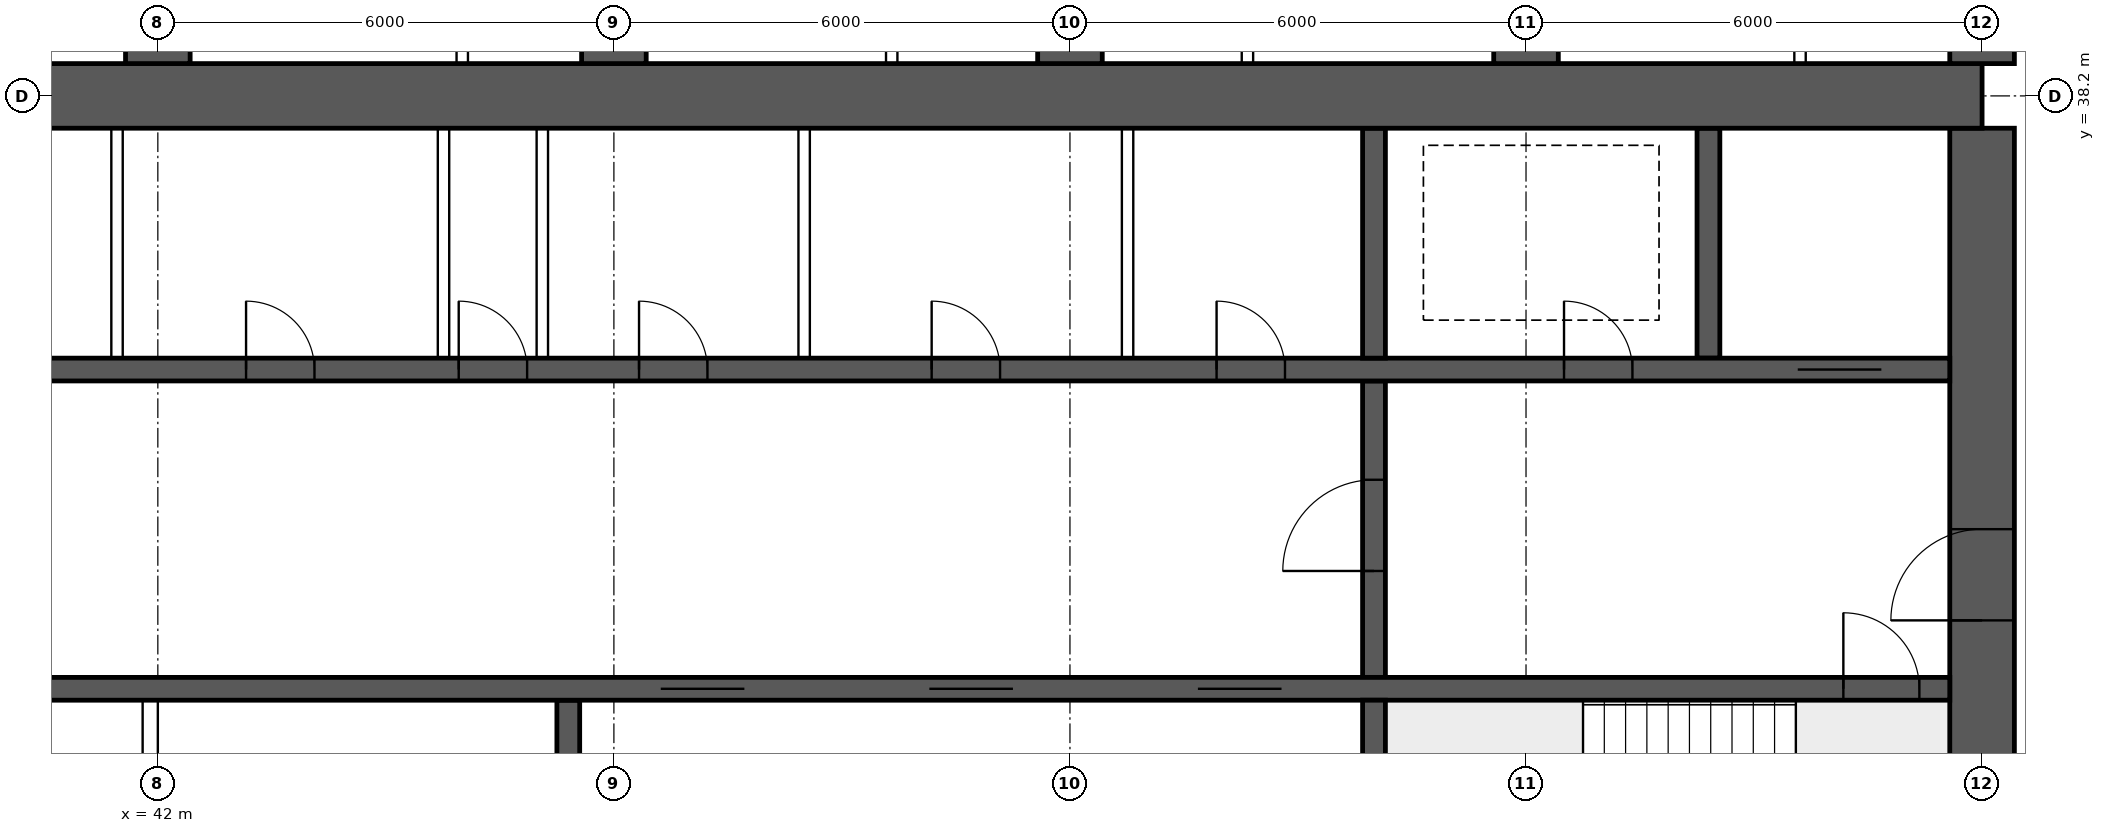
"""IFC4 building model, lengths in metres.
Left out: names, types, materials, properties, quantities, classifications, styles, units other than length and angle.
Written with IfcOpenShell. Run it as: python <this file> out.ifc"""

import sys

from ifc_helpers import new_model, si_unit, direction, frame, frame_2d, origin, place, context, subcontext, project, spatial, rectangle, extrude, element, fill, save


model = new_model("IFC4")
c1 = context("Model", 3, precision=1e-05, world=origin(), true_north=direction((0.0, 1.0)))
c2 = subcontext(c1, "Body", "Model", "MODEL_VIEW")
j1 = project(units=[si_unit("LENGTHUNIT", "METRE"), si_unit("PLANEANGLEUNIT", "RADIAN")], contexts=[c1])
p1 = place(None, origin())
s1 = spatial("IfcSite", under=j1, at=p1, CompositionType="ELEMENT")
p2 = place(p1, origin())
s2 = spatial("IfcBuilding", under=s1, at=p2, CompositionType="ELEMENT")
p3 = place(p2, frame((0.0, 0.0, 163.6)))
s3 = spatial("IfcBuildingStorey", under=s2, at=p3, CompositionType="ELEMENT", Elevation=163.6)
p4 = place(p3, frame((18.0, 38.2, 0.0), z_axis=(0.0, 0.0, 1.0), x_axis=(1.0, 0.0, 0.0)))
e1 = element("IfcWall", 1, at=p4, inside=s3, PredefinedType="SHEAR", context=c2, shape_type="SweptSolid", body=[
    extrude(rectangle(XDim=48.0, YDim=0.85, at=frame_2d((24.0, 0.0))), origin(), (0.0, 0.0, 1.0), 3.75),
])
p5 = place(p3, frame((66.0, 26.225, 0.0), z_axis=(0.0, 0.0, 1.0), x_axis=(0.0, 1.0, 0.0)))
e2 = element("IfcWall", 2, at=p5, inside=s3, PredefinedType="SHEAR", context=c2, shape_type="SweptSolid", body=[
    extrude(rectangle(XDim=11.55, YDim=0.85, at=frame_2d((5.775, 0.0))), origin(), (0.0, 0.0, 1.0), 3.75),
])
p6 = place(p5, frame((5.075, 0.0, 0.0)))
e3 = element("IfcOpeningElement", 3, at=p6, cuts=e2, PredefinedType="OPENING", context=c2, shape_type="SweptSolid", body=[
    extrude(rectangle(XDim=1.2, YDim=2.1, at=frame_2d((0.6, 1.05))), frame((0.0, 0.435, 0.0), z_axis=(0.0, -1.0, 0.0), x_axis=(1.0, 0.0, 0.0)), (0.0, 0.0, 1.0), 0.87),
])
p7 = place(p3, frame((18.425, 30.4, 0.0), z_axis=(0.0, 0.0, 1.0), x_axis=(1.0, 0.0, 0.0)))
e4 = element("IfcWall", 4, at=p7, inside=s3, PredefinedType="SHEAR", context=c2, shape_type="SweptSolid", body=[
    extrude(rectangle(XDim=47.15, YDim=0.3, at=frame_2d((23.575, 0.0))), origin(), (0.0, 0.0, 1.0), 3.75),
])
p8 = place(p7, frame((0.4, 0.0, 0.0)))
e5 = element("IfcOpeningElement", 5, at=p8, cuts=e4, PredefinedType="OPENING", context=c2, shape_type="SweptSolid", body=[
    extrude(rectangle(XDim=1.0, YDim=2.1, at=frame_2d((0.5, 1.05))), frame((0.0, 0.16, 0.0), z_axis=(0.0, -1.0, 0.0), x_axis=(1.0, 0.0, 0.0)), (0.0, 0.0, 1.0), 0.32),
])
p9 = place(p7, frame((45.75, 0.0, 0.0)))
e6 = element("IfcOpeningElement", 6, at=p9, cuts=e4, PredefinedType="OPENING", context=c2, shape_type="SweptSolid", body=[
    extrude(rectangle(XDim=1.0, YDim=2.1, at=frame_2d((0.5, 1.05))), frame((0.0, 0.16, 0.0), z_axis=(0.0, -1.0, 0.0), x_axis=(1.0, 0.0, 0.0)), (0.0, 0.0, 1.0), 0.32),
])
p10 = place(p7, frame((8.325, 0.0, 0.0)))
e7 = element("IfcOpeningElement", 7, at=p10, cuts=e4, PredefinedType="OPENING", context=c2, shape_type="SweptSolid", body=[
    extrude(rectangle(XDim=1.1, YDim=2.1, at=frame_2d((0.55, 1.05))), frame((0.0, 0.16, 0.0), z_axis=(0.0, -1.0, 0.0), x_axis=(1.0, 0.0, 0.0)), (0.0, 0.0, 1.0), 0.32),
])
p11 = place(p7, frame((10.925, 0.0, 0.0)))
e8 = element("IfcOpeningElement", 8, at=p11, cuts=e4, PredefinedType="OPENING", context=c2, shape_type="SweptSolid", body=[
    extrude(rectangle(XDim=1.1, YDim=2.1, at=frame_2d((0.55, 1.05))), frame((0.0, 0.16, 0.0), z_axis=(0.0, -1.0, 0.0), x_axis=(1.0, 0.0, 0.0)), (0.0, 0.0, 1.0), 0.32),
])
p12 = place(p7, frame((13.525, 0.0, 0.0)))
e9 = element("IfcOpeningElement", 9, at=p12, cuts=e4, PredefinedType="OPENING", context=c2, shape_type="SweptSolid", body=[
    extrude(rectangle(XDim=1.1, YDim=2.1, at=frame_2d((0.55, 1.05))), frame((0.0, 0.16, 0.0), z_axis=(0.0, -1.0, 0.0), x_axis=(1.0, 0.0, 0.0)), (0.0, 0.0, 1.0), 0.32),
])
p13 = place(p7, frame((16.125, 0.0, 0.0)))
e10 = element("IfcOpeningElement", 10, at=p13, cuts=e4, PredefinedType="OPENING", context=c2, shape_type="SweptSolid", body=[
    extrude(rectangle(XDim=1.1, YDim=2.1, at=frame_2d((0.55, 1.05))), frame((0.0, 0.16, 0.0), z_axis=(0.0, -1.0, 0.0), x_axis=(1.0, 0.0, 0.0)), (0.0, 0.0, 1.0), 0.32),
])
p14 = place(p7, frame((18.9, 0.0, 0.0)))
e11 = element("IfcOpeningElement", 11, at=p14, cuts=e4, PredefinedType="OPENING", context=c2, shape_type="SweptSolid", body=[
    extrude(rectangle(XDim=0.9, YDim=2.1, at=frame_2d((0.45, 1.05))), frame((0.0, 0.16, 0.0), z_axis=(0.0, -1.0, 0.0), x_axis=(1.0, 0.0, 0.0)), (0.0, 0.0, 1.0), 0.32),
])
p15 = place(p7, frame((30.192, 0.0, 0.0)))
e12 = element("IfcOpeningElement", 12, at=p15, cuts=e4, PredefinedType="OPENING", context=c2, shape_type="SweptSolid", body=[
    extrude(rectangle(XDim=1.1, YDim=2.1, at=frame_2d((0.55, 1.05))), frame((0.0, 0.16, 0.0), z_axis=(0.0, -1.0, 0.0), x_axis=(1.0, 0.0, 0.0)), (0.0, 0.0, 1.0), 0.32),
])
p16 = place(p7, frame((33.725, 0.0, 0.0)))
e13 = element("IfcOpeningElement", 13, at=p16, cuts=e4, PredefinedType="OPENING", context=c2, shape_type="SweptSolid", body=[
    extrude(rectangle(XDim=1.1, YDim=2.1, at=frame_2d((0.55, 1.05))), frame((0.0, 0.16, 0.0), z_axis=(0.0, -1.0, 0.0), x_axis=(1.0, 0.0, 0.0)), (0.0, 0.0, 1.0), 0.32),
])
p17 = place(p7, frame((37.258, 0.0, 0.0)))
e14 = element("IfcOpeningElement", 14, at=p17, cuts=e4, PredefinedType="OPENING", context=c2, shape_type="SweptSolid", body=[
    extrude(rectangle(XDim=1.1, YDim=2.1, at=frame_2d((0.55, 1.05))), frame((0.0, 0.16, 0.0), z_axis=(0.0, -1.0, 0.0), x_axis=(1.0, 0.0, 0.0)), (0.0, 0.0, 1.0), 0.32),
])
p18 = place(p3, frame((18.425, 34.6, 0.0), z_axis=(0.0, 0.0, 1.0), x_axis=(1.0, 0.0, 0.0)))
e15 = element("IfcWall", 15, at=p18, inside=s3, PredefinedType="SHEAR", context=c2, shape_type="SweptSolid", body=[
    extrude(rectangle(XDim=47.15, YDim=0.3, at=frame_2d((23.575, 0.0))), origin(), (0.0, 0.0, 1.0), 3.75),
])
p19 = place(p18, frame((0.9, 0.0, 0.0)))
e16 = element("IfcOpeningElement", 16, at=p19, cuts=e15, PredefinedType="OPENING", context=c2, shape_type="SweptSolid", body=[
    extrude(rectangle(XDim=1.1, YDim=2.1, at=frame_2d((0.55, 1.05))), frame((0.0, 0.16, 0.0), z_axis=(0.0, -1.0, 0.0), x_axis=(1.0, 0.0, 0.0)), (0.0, 0.0, 1.0), 0.32),
])
p20 = place(p18, frame((45.15, 0.0, 0.0)))
e17 = element("IfcOpeningElement", 17, at=p20, cuts=e15, PredefinedType="OPENING", context=c2, shape_type="SweptSolid", body=[
    extrude(rectangle(XDim=1.1, YDim=2.1, at=frame_2d((0.55, 1.05))), frame((0.0, 0.16, 0.0), z_axis=(0.0, -1.0, 0.0), x_axis=(1.0, 0.0, 0.0)), (0.0, 0.0, 1.0), 0.32),
])
p21 = place(p18, frame((4.175, 0.0, 0.0)))
e18 = element("IfcOpeningElement", 18, at=p21, cuts=e15, PredefinedType="OPENING", context=c2, shape_type="SweptSolid", body=[
    extrude(rectangle(XDim=0.9, YDim=2.1, at=frame_2d((0.45, 1.05))), frame((0.0, 0.16, 0.0), z_axis=(0.0, -1.0, 0.0), x_axis=(1.0, 0.0, 0.0)), (0.0, 0.0, 1.0), 0.32),
])
p22 = place(p18, frame((42.075, 0.0, 0.0)))
e19 = element("IfcOpeningElement", 19, at=p22, cuts=e15, PredefinedType="OPENING", context=c2, shape_type="SweptSolid", body=[
    extrude(rectangle(XDim=0.9, YDim=2.1, at=frame_2d((0.45, 1.05))), frame((0.0, 0.16, 0.0), z_axis=(0.0, -1.0, 0.0), x_axis=(1.0, 0.0, 0.0)), (0.0, 0.0, 1.0), 0.32),
])
p23 = place(p18, frame((8.95, 0.0, 0.0)))
e20 = element("IfcOpeningElement", 20, at=p23, cuts=e15, PredefinedType="OPENING", context=c2, shape_type="SweptSolid", body=[
    extrude(rectangle(XDim=0.9, YDim=2.1, at=frame_2d((0.45, 1.05))), frame((0.0, 0.16, 0.0), z_axis=(0.0, -1.0, 0.0), x_axis=(1.0, 0.0, 0.0)), (0.0, 0.0, 1.0), 0.32),
])
p24 = place(p18, frame((12.924, 0.0, 0.0)))
e21 = element("IfcOpeningElement", 21, at=p24, cuts=e15, PredefinedType="OPENING", context=c2, shape_type="SweptSolid", body=[
    extrude(rectangle(XDim=0.9, YDim=2.1, at=frame_2d((0.45, 1.05))), frame((0.0, 0.16, 0.0), z_axis=(0.0, -1.0, 0.0), x_axis=(1.0, 0.0, 0.0)), (0.0, 0.0, 1.0), 0.32),
])
p25 = place(p18, frame((16.571, 0.0, 0.0)))
e22 = element("IfcOpeningElement", 22, at=p25, cuts=e15, PredefinedType="OPENING", context=c2, shape_type="SweptSolid", body=[
    extrude(rectangle(XDim=0.9, YDim=2.1, at=frame_2d((0.45, 1.05))), frame((0.0, 0.16, 0.0), z_axis=(0.0, -1.0, 0.0), x_axis=(1.0, 0.0, 0.0)), (0.0, 0.0, 1.0), 0.32),
])
p26 = place(p18, frame((20.33, 0.0, 0.0)))
e23 = element("IfcOpeningElement", 23, at=p26, cuts=e15, PredefinedType="OPENING", context=c2, shape_type="SweptSolid", body=[
    extrude(rectangle(XDim=0.9, YDim=2.1, at=frame_2d((0.45, 1.05))), frame((0.0, 0.16, 0.0), z_axis=(0.0, -1.0, 0.0), x_axis=(1.0, 0.0, 0.0)), (0.0, 0.0, 1.0), 0.32),
])
p27 = place(p18, frame((24.736, 0.0, 0.0)))
e24 = element("IfcOpeningElement", 24, at=p27, cuts=e15, PredefinedType="OPENING", context=c2, shape_type="SweptSolid", body=[
    extrude(rectangle(XDim=0.9, YDim=2.1, at=frame_2d((0.45, 1.05))), frame((0.0, 0.16, 0.0), z_axis=(0.0, -1.0, 0.0), x_axis=(1.0, 0.0, 0.0)), (0.0, 0.0, 1.0), 0.32),
])
p28 = place(p18, frame((27.533, 0.0, 0.0)))
e25 = element("IfcOpeningElement", 25, at=p28, cuts=e15, PredefinedType="OPENING", context=c2, shape_type="SweptSolid", body=[
    extrude(rectangle(XDim=0.9, YDim=2.1, at=frame_2d((0.45, 1.05))), frame((0.0, 0.16, 0.0), z_axis=(0.0, -1.0, 0.0), x_axis=(1.0, 0.0, 0.0)), (0.0, 0.0, 1.0), 0.32),
])
p29 = place(p18, frame((29.906, 0.0, 0.0)))
e26 = element("IfcOpeningElement", 26, at=p29, cuts=e15, PredefinedType="OPENING", context=c2, shape_type="SweptSolid", body=[
    extrude(rectangle(XDim=0.9, YDim=2.1, at=frame_2d((0.45, 1.05))), frame((0.0, 0.16, 0.0), z_axis=(0.0, -1.0, 0.0), x_axis=(1.0, 0.0, 0.0)), (0.0, 0.0, 1.0), 0.32),
])
p30 = place(p18, frame((33.756, 0.0, 0.0)))
e27 = element("IfcOpeningElement", 27, at=p30, cuts=e15, PredefinedType="OPENING", context=c2, shape_type="SweptSolid", body=[
    extrude(rectangle(XDim=0.9, YDim=2.1, at=frame_2d((0.45, 1.05))), frame((0.0, 0.16, 0.0), z_axis=(0.0, -1.0, 0.0), x_axis=(1.0, 0.0, 0.0)), (0.0, 0.0, 1.0), 0.32),
])
p31 = place(p18, frame((37.504, 0.0, 0.0)))
e28 = element("IfcOpeningElement", 28, at=p31, cuts=e15, PredefinedType="OPENING", context=c2, shape_type="SweptSolid", body=[
    extrude(rectangle(XDim=0.9, YDim=2.1, at=frame_2d((0.45, 1.05))), frame((0.0, 0.16, 0.0), z_axis=(0.0, -1.0, 0.0), x_axis=(1.0, 0.0, 0.0)), (0.0, 0.0, 1.0), 0.32),
])
p32 = place(p3, frame((58.0, 26.225, 0.0), z_axis=(0.0, 0.0, 1.0), x_axis=(0.0, 1.0, 0.0)))
e29 = element("IfcWall", 29, at=p32, inside=s3, PredefinedType="SHEAR", context=c2, shape_type="SweptSolid", body=[
    extrude(rectangle(XDim=4.025, YDim=0.3, at=frame_2d((2.012, 0.0))), origin(), (0.0, 0.0, 1.0), 3.75),
])
p33 = place(p3, frame((58.0, 30.55, 0.0), z_axis=(0.0, 0.0, 1.0), x_axis=(0.0, 1.0, 0.0)))
e30 = element("IfcWall", 30, at=p33, inside=s3, PredefinedType="SHEAR", context=c2, shape_type="SweptSolid", body=[
    extrude(rectangle(XDim=3.9, YDim=0.3, at=frame_2d((1.95, 0.0))), origin(), (0.0, 0.0, 1.0), 3.75),
])
p34 = place(p33, frame((1.4, 0.0, 0.0)))
e31 = element("IfcOpeningElement", 31, at=p34, cuts=e30, PredefinedType="OPENING", context=c2, shape_type="SweptSolid", body=[
    extrude(rectangle(XDim=1.2, YDim=2.1, at=frame_2d((0.6, 1.05))), frame((0.0, 0.16, 0.0), z_axis=(0.0, -1.0, 0.0), x_axis=(1.0, 0.0, 0.0)), (0.0, 0.0, 1.0), 0.32),
])
for number, where, z_axis, x_axis in (
    (32, (62.4, 34.75, 0.0), (0.0, 0.0, 1.0), (0.0, 1.0, 0.0)),
    (33, (58.0, 34.75, 0.0), (0.0, 0.0, 1.0), (0.0, 1.0, 0.0)),
):
    element("IfcWall", number, at=place(p3, frame(where, z_axis=z_axis, x_axis=x_axis)), inside=s3, PredefinedType="SHEAR", context=c2, shape_type="SweptSolid", body=[
        extrude(rectangle(XDim=3.025, YDim=0.3, at=frame_2d((1.512, 0.0))), origin(), (0.0, 0.0, 1.0), 3.75),
    ])
p35 = place(p3, frame((47.4, 26.225, 0.0), z_axis=(0.0, 0.0, 1.0), x_axis=(0.0, 1.0, 0.0)))
e34 = element("IfcWall", 34, at=p35, inside=s3, PredefinedType="SHEAR", context=c2, shape_type="SweptSolid", body=[
    extrude(rectangle(XDim=4.025, YDim=0.3, at=frame_2d((2.012, 0.0))), origin(), (0.0, 0.0, 1.0), 3.75),
])
for number, where, z_axis, x_axis in (
    (35, (42.0, 38.625, 0.0), (0.0, 0.0, 1.0), (0.0, 1.0, 0.0)),
    (36, (48.0, 38.625, 0.0), (0.0, 0.0, 1.0), (0.0, 1.0, 0.0)),
    (37, (54.0, 38.625, 0.0), (0.0, 0.0, 1.0), (0.0, 1.0, 0.0)),
    (38, (60.0, 38.625, 0.0), (0.0, 0.0, 1.0), (0.0, 1.0, 0.0)),
    (39, (66.0, 38.625, 0.0), (0.0, 0.0, 1.0), (0.0, 1.0, 0.0)),
):
    element("IfcWall", number, at=place(p3, frame(where, z_axis=z_axis, x_axis=x_axis)), inside=s3, PredefinedType="SHEAR", context=c2, shape_type="SweptSolid", body=[
        extrude(rectangle(XDim=8.175, YDim=0.85, at=frame_2d((4.087, 0.0))), origin(), (0.0, 0.0, 1.0), 3.75),
    ])
for number, where, z_axis, x_axis in (
    (40, (41.463, 34.75, 0.0), (0.0, 0.0, 1.0), (0.0, 1.0, 0.0)),
    (41, (45.758, 34.75, 0.0), (0.0, 0.0, 1.0), (0.0, 1.0, 0.0)),
    (42, (47.058, 34.75, 0.0), (0.0, 0.0, 1.0), (0.0, 1.0, 0.0)),
    (43, (50.503, 34.75, 0.0), (0.0, 0.0, 1.0), (0.0, 1.0, 0.0)),
    (44, (54.758, 34.75, 0.0), (0.0, 0.0, 1.0), (0.0, 1.0, 0.0)),
):
    element("IfcWall", number, at=place(p3, frame(where, z_axis=z_axis, x_axis=x_axis)), inside=s3, PredefinedType="SOLIDWALL", context=c2, shape_type="SweptSolid", body=[
        extrude(rectangle(XDim=3.025, YDim=0.15, at=frame_2d((1.512, 0.0))), origin(), (0.0, 0.0, 1.0), 3.5),
    ])
p36 = place(p3, frame((41.9, 26.225, 0.0), z_axis=(0.0, 0.0, 1.0), x_axis=(0.0, 1.0, 0.0)))
e45 = element("IfcWall", 45, at=p36, inside=s3, PredefinedType="SOLIDWALL", context=c2, shape_type="SweptSolid", body=[
    extrude(rectangle(XDim=4.025, YDim=0.2, at=frame_2d((2.012, 0.0))), origin(), (0.0, 0.0, 1.0), 3.5),
])
for number, where, z_axis, x_axis in (
    (46, (46.005, 38.625, 0.0), (0.0, 0.0, 1.0), (0.0, 1.0, 0.0)),
    (47, (51.655, 38.625, 0.0), (0.0, 0.0, 1.0), (0.0, 1.0, 0.0)),
    (48, (56.335, 38.625, 0.0), (0.0, 0.0, 1.0), (0.0, 1.0, 0.0)),
    (49, (63.605, 38.625, 0.0), (0.0, 0.0, 1.0), (0.0, 1.0, 0.0)),
):
    element("IfcWall", number, at=place(p3, frame(where, z_axis=z_axis, x_axis=x_axis)), inside=s3, PredefinedType="PARTITIONING", context=c2, shape_type="SweptSolid", body=[
        extrude(rectangle(XDim=8.075, YDim=0.15, at=frame_2d((4.038, 0.0))), origin(), (0.0, 0.0, 1.0), 3.5),
    ])
p37 = place(p6, origin())
e50 = element("IfcDoor", 50, at=p37, inside=s3, OperationType="SINGLE_SWING_LEFT", PredefinedType="DOOR", context=c2, shape_type="SweptSolid", body=[
    extrude(rectangle(XDim=1.2, YDim=2.1, at=frame_2d((0.6, 1.05))), frame((0.0, 0.025, 0.0), z_axis=(0.0, -1.0, 0.0), x_axis=(1.0, 0.0, 0.0)), (0.0, 0.0, 1.0), 0.05),
])
fill(e3, e50)
p38 = place(p9, origin())
e51 = element("IfcDoor", 51, at=p38, inside=s3, OperationType="SINGLE_SWING_LEFT", PredefinedType="DOOR", context=c2, shape_type="SweptSolid", body=[
    extrude(rectangle(XDim=1.0, YDim=2.1, at=frame_2d((0.5, 1.05))), frame((0.0, 0.025, 0.0), z_axis=(0.0, -1.0, 0.0), x_axis=(1.0, 0.0, 0.0)), (0.0, 0.0, 1.0), 0.05),
])
fill(e6, e51)
p39 = place(p20, origin())
e52 = element("IfcDoor", 52, at=p39, inside=s3, OperationType="DOUBLE_DOOR_SLIDING", PredefinedType="DOOR", context=c2, shape_type="SweptSolid", body=[
    extrude(rectangle(XDim=1.1, YDim=2.1, at=frame_2d((0.55, 1.05))), frame((0.0, 0.025, 0.0), z_axis=(0.0, -1.0, 0.0), x_axis=(1.0, 0.0, 0.0)), (0.0, 0.0, 1.0), 0.05),
])
fill(e17, e52)
p40 = place(p22, origin())
e53 = element("IfcDoor", 53, at=p40, inside=s3, OperationType="SINGLE_SWING_LEFT", PredefinedType="DOOR", context=c2, shape_type="SweptSolid", body=[
    extrude(rectangle(XDim=0.9, YDim=2.1, at=frame_2d((0.45, 1.05))), frame((0.0, 0.025, 0.0), z_axis=(0.0, -1.0, 0.0), x_axis=(1.0, 0.0, 0.0)), (0.0, 0.0, 1.0), 0.05),
])
fill(e19, e53)
p41 = place(p34, origin())
e54 = element("IfcDoor", 54, at=p41, inside=s3, OperationType="SINGLE_SWING_LEFT", PredefinedType="DOOR", context=c2, shape_type="SweptSolid", body=[
    extrude(rectangle(XDim=1.2, YDim=2.1, at=frame_2d((0.6, 1.05))), frame((0.0, 0.025, 0.0), z_axis=(0.0, -1.0, 0.0), x_axis=(1.0, 0.0, 0.0)), (0.0, 0.0, 1.0), 0.05),
])
fill(e31, e54)
p42 = place(p27, origin())
e55 = element("IfcDoor", 55, at=p42, inside=s3, OperationType="SINGLE_SWING_LEFT", PredefinedType="DOOR", context=c2, shape_type="SweptSolid", body=[
    extrude(rectangle(XDim=0.9, YDim=2.1, at=frame_2d((0.45, 1.05))), frame((0.0, 0.025, 0.0), z_axis=(0.0, -1.0, 0.0), x_axis=(1.0, 0.0, 0.0)), (0.0, 0.0, 1.0), 0.05),
])
fill(e24, e55)
p43 = place(p28, origin())
e56 = element("IfcDoor", 56, at=p43, inside=s3, OperationType="SINGLE_SWING_LEFT", PredefinedType="DOOR", context=c2, shape_type="SweptSolid", body=[
    extrude(rectangle(XDim=0.9, YDim=2.1, at=frame_2d((0.45, 1.05))), frame((0.0, 0.025, 0.0), z_axis=(0.0, -1.0, 0.0), x_axis=(1.0, 0.0, 0.0)), (0.0, 0.0, 1.0), 0.05),
])
fill(e25, e56)
p44 = place(p29, origin())
e57 = element("IfcDoor", 57, at=p44, inside=s3, OperationType="SINGLE_SWING_LEFT", PredefinedType="DOOR", context=c2, shape_type="SweptSolid", body=[
    extrude(rectangle(XDim=0.9, YDim=2.1, at=frame_2d((0.45, 1.05))), frame((0.0, 0.025, 0.0), z_axis=(0.0, -1.0, 0.0), x_axis=(1.0, 0.0, 0.0)), (0.0, 0.0, 1.0), 0.05),
])
fill(e26, e57)
p45 = place(p30, origin())
e58 = element("IfcDoor", 58, at=p45, inside=s3, OperationType="SINGLE_SWING_LEFT", PredefinedType="DOOR", context=c2, shape_type="SweptSolid", body=[
    extrude(rectangle(XDim=0.9, YDim=2.1, at=frame_2d((0.45, 1.05))), frame((0.0, 0.025, 0.0), z_axis=(0.0, -1.0, 0.0), x_axis=(1.0, 0.0, 0.0)), (0.0, 0.0, 1.0), 0.05),
])
fill(e27, e58)
p46 = place(p31, origin())
e59 = element("IfcDoor", 59, at=p46, inside=s3, OperationType="SINGLE_SWING_LEFT", PredefinedType="DOOR", context=c2, shape_type="SweptSolid", body=[
    extrude(rectangle(XDim=0.9, YDim=2.1, at=frame_2d((0.45, 1.05))), frame((0.0, 0.025, 0.0), z_axis=(0.0, -1.0, 0.0), x_axis=(1.0, 0.0, 0.0)), (0.0, 0.0, 1.0), 0.05),
])
fill(e28, e59)
p47 = place(p15, origin())
e60 = element("IfcDoor", 60, at=p47, inside=s3, OperationType="DOUBLE_DOOR_SLIDING", PredefinedType="DOOR", context=c2, shape_type="SweptSolid", body=[
    extrude(rectangle(XDim=1.1, YDim=2.1, at=frame_2d((0.55, 1.05))), frame((0.0, 0.025, 0.0), z_axis=(0.0, -1.0, 0.0), x_axis=(1.0, 0.0, 0.0)), (0.0, 0.0, 1.0), 0.05),
])
fill(e12, e60)
p48 = place(p16, origin())
e61 = element("IfcDoor", 61, at=p48, inside=s3, OperationType="DOUBLE_DOOR_SLIDING", PredefinedType="DOOR", context=c2, shape_type="SweptSolid", body=[
    extrude(rectangle(XDim=1.1, YDim=2.1, at=frame_2d((0.55, 1.05))), frame((0.0, 0.025, 0.0), z_axis=(0.0, -1.0, 0.0), x_axis=(1.0, 0.0, 0.0)), (0.0, 0.0, 1.0), 0.05),
])
fill(e13, e61)
p49 = place(p17, origin())
e62 = element("IfcDoor", 62, at=p49, inside=s3, OperationType="DOUBLE_DOOR_SLIDING", PredefinedType="DOOR", context=c2, shape_type="SweptSolid", body=[
    extrude(rectangle(XDim=1.1, YDim=2.1, at=frame_2d((0.55, 1.05))), frame((0.0, 0.025, 0.0), z_axis=(0.0, -1.0, 0.0), x_axis=(1.0, 0.0, 0.0)), (0.0, 0.0, 1.0), 0.05),
])
fill(e14, e62)
save(model, sys.argv[1])
